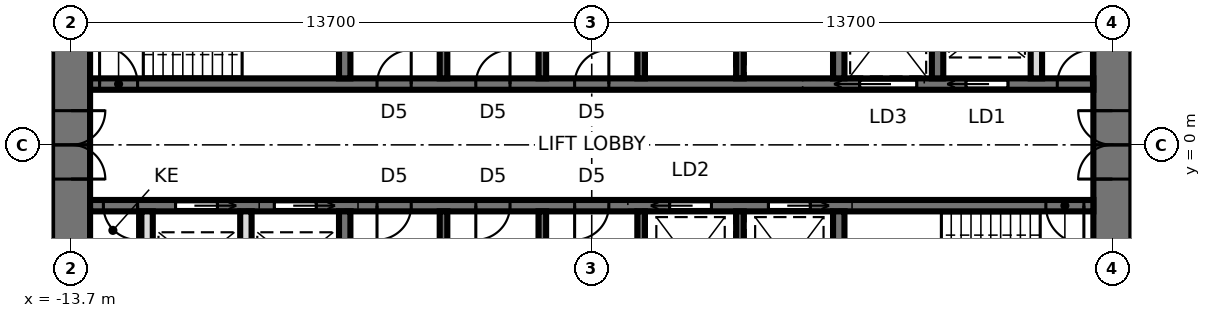
"""IFC4 building model, lengths in metres.
Left out: names, types, materials, properties, quantities, classifications, styles, units other than length and angle.
Written with IfcOpenShell. Run it as: python <this file> out.ifc"""

import sys

from ifc_helpers import new_model, si_unit, direction, frame, frame_2d, origin, place, context, subcontext, project, spatial, rectangle, extrude, element, fill, save


model = new_model("IFC4")
c1 = context("Model", 3, precision=1e-05, world=origin(), true_north=direction((0.0, 1.0)))
c2 = subcontext(c1, "Body", "Model", "MODEL_VIEW")
j1 = project(units=[si_unit("LENGTHUNIT", "METRE"), si_unit("PLANEANGLEUNIT", "RADIAN")], contexts=[c1])
p1 = place(None, origin())
s1 = spatial("IfcSite", under=j1, at=p1, CompositionType="ELEMENT")
p2 = place(p1, origin())
s2 = spatial("IfcBuilding", under=s1, at=p2, CompositionType="ELEMENT")
p3 = place(p2, frame((0.0, 0.0, 215.0)))
s3 = spatial("IfcBuildingStorey", under=s2, at=p3, CompositionType="ELEMENT", Elevation=215.0)
p4 = place(p3, frame((13.7, -9.5, 0.0), z_axis=(0.0, 0.0, 1.0), x_axis=(0.0, 1.0, 0.0)))
e1 = element("IfcWall", 1, at=p4, inside=s3, PredefinedType="SHEAR", context=c2, shape_type="SweptSolid", body=[
    extrude(rectangle(XDim=19.0, YDim=1.0, at=frame_2d((9.5, 0.0))), origin(), (0.0, 0.0, 1.0), 3.9),
])
p5 = place(p4, frame((8.6, 0.0, 0.0)))
e2 = element("IfcOpeningElement", 2, at=p5, cuts=e1, PredefinedType="OPENING", context=c2, shape_type="SweptSolid", body=[
    extrude(rectangle(XDim=1.8, YDim=2.4, at=frame_2d((0.9, 1.2))), frame((0.0, 0.51, 0.0), z_axis=(0.0, -1.0, 0.0), x_axis=(1.0, 0.0, 0.0)), (0.0, 0.0, 1.0), 1.02),
])
p6 = place(p3, frame((-13.7, 9.5, 0.0), z_axis=(0.0, 0.0, 1.0), x_axis=(0.0, -1.0, 0.0)))
e3 = element("IfcWall", 3, at=p6, inside=s3, PredefinedType="SHEAR", context=c2, shape_type="SweptSolid", body=[
    extrude(rectangle(XDim=19.0, YDim=1.0, at=frame_2d((9.5, 0.0))), origin(), (0.0, 0.0, 1.0), 3.9),
])
p7 = place(p6, frame((8.6, 0.0, 0.0)))
e4 = element("IfcOpeningElement", 4, at=p7, cuts=e3, PredefinedType="OPENING", context=c2, shape_type="SweptSolid", body=[
    extrude(rectangle(XDim=1.8, YDim=2.4, at=frame_2d((0.9, 1.2))), frame((0.0, 0.51, 0.0), z_axis=(0.0, -1.0, 0.0), x_axis=(1.0, 0.0, 0.0)), (0.0, 0.0, 1.0), 1.02),
])
p8 = place(p3, frame((-13.2, 1.6, 0.0), z_axis=(0.0, 0.0, 1.0), x_axis=(1.0, 0.0, 0.0)))
e5 = element("IfcWall", 5, at=p8, inside=s3, PredefinedType="SHEAR", context=c2, shape_type="SweptSolid", body=[
    extrude(rectangle(XDim=26.4, YDim=0.3, at=frame_2d((13.2, 0.0))), origin(), (0.0, 0.0, 1.0), 3.9),
])
p9 = place(p8, frame((0.25, 0.0, 0.0)))
e6 = element("IfcOpeningElement", 6, at=p9, cuts=e5, PredefinedType="OPENING", context=c2, shape_type="SweptSolid", body=[
    extrude(rectangle(XDim=1.0, YDim=2.1, at=frame_2d((0.5, 1.05))), frame((0.0, 0.16, 0.0), z_axis=(0.0, -1.0, 0.0), x_axis=(1.0, 0.0, 0.0)), (0.0, 0.0, 1.0), 0.32),
])
p10 = place(p8, frame((23.05, 0.0, 0.0)))
e7 = element("IfcOpeningElement", 7, at=p10, cuts=e5, PredefinedType="OPENING", context=c2, shape_type="SweptSolid", body=[
    extrude(rectangle(XDim=1.1, YDim=2.3, at=frame_2d((0.55, 1.15))), frame((0.0, 0.16, 0.0), z_axis=(0.0, -1.0, 0.0), x_axis=(1.0, 0.0, 0.0)), (0.0, 0.0, 1.0), 0.32),
])
p11 = place(p8, frame((20.25, 0.0, 0.0)))
e8 = element("IfcOpeningElement", 8, at=p11, cuts=e5, PredefinedType="OPENING", context=c2, shape_type="SweptSolid", body=[
    extrude(rectangle(XDim=1.5, YDim=2.4, at=frame_2d((0.75, 1.2))), frame((0.0, 0.16, 0.0), z_axis=(0.0, -1.0, 0.0), x_axis=(1.0, 0.0, 0.0)), (0.0, 0.0, 1.0), 0.32),
])
p12 = place(p8, frame((7.55, 0.0, 0.0)))
e9 = element("IfcOpeningElement", 9, at=p12, cuts=e5, PredefinedType="OPENING", context=c2, shape_type="SweptSolid", body=[
    extrude(rectangle(XDim=0.9, YDim=2.1, at=frame_2d((0.45, 1.05))), frame((0.0, 0.16, 0.0), z_axis=(0.0, -1.0, 0.0), x_axis=(1.0, 0.0, 0.0)), (0.0, 0.0, 1.0), 0.32),
])
p13 = place(p8, frame((10.15, 0.0, 0.0)))
e10 = element("IfcOpeningElement", 10, at=p13, cuts=e5, PredefinedType="OPENING", context=c2, shape_type="SweptSolid", body=[
    extrude(rectangle(XDim=0.9, YDim=2.1, at=frame_2d((0.45, 1.05))), frame((0.0, 0.16, 0.0), z_axis=(0.0, -1.0, 0.0), x_axis=(1.0, 0.0, 0.0)), (0.0, 0.0, 1.0), 0.32),
])
p14 = place(p8, frame((12.75, 0.0, 0.0)))
e11 = element("IfcOpeningElement", 11, at=p14, cuts=e5, PredefinedType="OPENING", context=c2, shape_type="SweptSolid", body=[
    extrude(rectangle(XDim=0.9, YDim=2.1, at=frame_2d((0.45, 1.05))), frame((0.0, 0.16, 0.0), z_axis=(0.0, -1.0, 0.0), x_axis=(1.0, 0.0, 0.0)), (0.0, 0.0, 1.0), 0.32),
])
p15 = place(p8, frame((25.45, 0.0, 0.0)))
e12 = element("IfcOpeningElement", 12, at=p15, cuts=e5, PredefinedType="OPENING", context=c2, shape_type="SweptSolid", body=[
    extrude(rectangle(XDim=0.9, YDim=2.1, at=frame_2d((0.45, 1.05))), frame((0.0, 0.16, 0.0), z_axis=(0.0, -1.0, 0.0), x_axis=(1.0, 0.0, 0.0)), (0.0, 0.0, 1.0), 0.32),
])
p16 = place(p3, frame((-13.2, -1.6, 0.0), z_axis=(0.0, 0.0, 1.0), x_axis=(1.0, 0.0, 0.0)))
e13 = element("IfcWall", 13, at=p16, inside=s3, PredefinedType="SHEAR", context=c2, shape_type="SweptSolid", body=[
    extrude(rectangle(XDim=26.4, YDim=0.3, at=frame_2d((13.2, 0.0))), origin(), (0.0, 0.0, 1.0), 3.9),
])
p17 = place(p16, frame((25.15, 0.0, 0.0)))
e14 = element("IfcOpeningElement", 14, at=p17, cuts=e13, PredefinedType="OPENING", context=c2, shape_type="SweptSolid", body=[
    extrude(rectangle(XDim=1.0, YDim=2.1, at=frame_2d((0.5, 1.05))), frame((0.0, 0.16, 0.0), z_axis=(0.0, -1.0, 0.0), x_axis=(1.0, 0.0, 0.0)), (0.0, 0.0, 1.0), 0.32),
])
p18 = place(p16, frame((7.55, 0.0, 0.0)))
e15 = element("IfcOpeningElement", 15, at=p18, cuts=e13, PredefinedType="OPENING", context=c2, shape_type="SweptSolid", body=[
    extrude(rectangle(XDim=0.9, YDim=2.1, at=frame_2d((0.45, 1.05))), frame((0.0, 0.16, 0.0), z_axis=(0.0, -1.0, 0.0), x_axis=(1.0, 0.0, 0.0)), (0.0, 0.0, 1.0), 0.32),
])
p19 = place(p16, frame((10.15, 0.0, 0.0)))
e16 = element("IfcOpeningElement", 16, at=p19, cuts=e13, PredefinedType="OPENING", context=c2, shape_type="SweptSolid", body=[
    extrude(rectangle(XDim=0.9, YDim=2.1, at=frame_2d((0.45, 1.05))), frame((0.0, 0.16, 0.0), z_axis=(0.0, -1.0, 0.0), x_axis=(1.0, 0.0, 0.0)), (0.0, 0.0, 1.0), 0.32),
])
p20 = place(p16, frame((12.75, 0.0, 0.0)))
e17 = element("IfcOpeningElement", 17, at=p20, cuts=e13, PredefinedType="OPENING", context=c2, shape_type="SweptSolid", body=[
    extrude(rectangle(XDim=0.9, YDim=2.1, at=frame_2d((0.45, 1.05))), frame((0.0, 0.16, 0.0), z_axis=(0.0, -1.0, 0.0), x_axis=(1.0, 0.0, 0.0)), (0.0, 0.0, 1.0), 0.32),
])
p21 = place(p16, frame((15.25, 0.0, 0.0)))
e18 = element("IfcOpeningElement", 18, at=p21, cuts=e13, PredefinedType="OPENING", context=c2, shape_type="SweptSolid", body=[
    extrude(rectangle(XDim=1.1, YDim=2.3, at=frame_2d((0.55, 1.15))), frame((0.0, 0.16, 0.0), z_axis=(0.0, -1.0, 0.0), x_axis=(1.0, 0.0, 0.0)), (0.0, 0.0, 1.0), 0.32),
])
p22 = place(p16, frame((17.85, 0.0, 0.0)))
e19 = element("IfcOpeningElement", 19, at=p22, cuts=e13, PredefinedType="OPENING", context=c2, shape_type="SweptSolid", body=[
    extrude(rectangle(XDim=1.1, YDim=2.3, at=frame_2d((0.55, 1.15))), frame((0.0, 0.16, 0.0), z_axis=(0.0, -1.0, 0.0), x_axis=(1.0, 0.0, 0.0)), (0.0, 0.0, 1.0), 0.32),
])
p23 = place(p16, frame((4.85, 0.0, 0.0)))
e20 = element("IfcOpeningElement", 20, at=p23, cuts=e13, PredefinedType="OPENING", context=c2, shape_type="SweptSolid", body=[
    extrude(rectangle(XDim=1.1, YDim=2.3, at=frame_2d((0.55, 1.15))), frame((0.0, 0.16, 0.0), z_axis=(0.0, -1.0, 0.0), x_axis=(1.0, 0.0, 0.0)), (0.0, 0.0, 1.0), 0.32),
])
p24 = place(p16, frame((2.25, 0.0, 0.0)))
e21 = element("IfcOpeningElement", 21, at=p24, cuts=e13, PredefinedType="OPENING", context=c2, shape_type="SweptSolid", body=[
    extrude(rectangle(XDim=1.1, YDim=2.3, at=frame_2d((0.55, 1.15))), frame((0.0, 0.16, 0.0), z_axis=(0.0, -1.0, 0.0), x_axis=(1.0, 0.0, 0.0)), (0.0, 0.0, 1.0), 0.32),
])
p25 = place(p16, frame((0.35, 0.0, 0.0)))
e22 = element("IfcOpeningElement", 22, at=p25, cuts=e13, PredefinedType="OPENING", context=c2, shape_type="SweptSolid", body=[
    extrude(rectangle(XDim=0.9, YDim=2.1, at=frame_2d((0.45, 1.05))), frame((0.0, 0.16, 0.0), z_axis=(0.0, -1.0, 0.0), x_axis=(1.0, 0.0, 0.0)), (0.0, 0.0, 1.0), 0.32),
])
for number, where, z_axis, x_axis in (
    (23, (-6.5, 1.75, 0.0), (0.0, 0.0, 1.0), (0.0, 1.0, 0.0)),
    (24, (6.5, 1.75, 0.0), (0.0, 0.0, 1.0), (0.0, 1.0, 0.0)),
):
    element("IfcWall", number, at=place(p3, frame(where, z_axis=z_axis, x_axis=x_axis)), inside=s3, PredefinedType="SHEAR", context=c2, shape_type="SweptSolid", body=[
        extrude(rectangle(XDim=2.7, YDim=0.3, at=frame_2d((1.35, 0.0))), origin(), (0.0, 0.0, 1.0), 3.9),
    ])
for number, where, z_axis, x_axis in (
    (25, (-3.9, 1.75, 0.0), (0.0, 0.0, 1.0), (0.0, 1.0, 0.0)),
    (26, (-1.3, 1.75, 0.0), (0.0, 0.0, 1.0), (0.0, 1.0, 0.0)),
    (27, (1.3, 1.75, 0.0), (0.0, 0.0, 1.0), (0.0, 1.0, 0.0)),
    (28, (3.9, 1.75, 0.0), (0.0, 0.0, 1.0), (0.0, 1.0, 0.0)),
):
    element("IfcWall", number, at=place(p3, frame(where, z_axis=z_axis, x_axis=x_axis)), inside=s3, PredefinedType="SHEAR", context=c2, shape_type="SweptSolid", body=[
        extrude(rectangle(XDim=2.7, YDim=0.2, at=frame_2d((1.35, 0.0))), origin(), (0.0, 0.0, 1.0), 3.9),
    ])
for number, where, z_axis, x_axis in (
    (29, (-6.5, -1.75, 0.0), (0.0, 0.0, 1.0), (0.0, -1.0, 0.0)),
    (30, (6.5, -1.75, 0.0), (0.0, 0.0, 1.0), (0.0, -1.0, 0.0)),
):
    element("IfcWall", number, at=place(p3, frame(where, z_axis=z_axis, x_axis=x_axis)), inside=s3, PredefinedType="SHEAR", context=c2, shape_type="SweptSolid", body=[
        extrude(rectangle(XDim=2.7, YDim=0.3, at=frame_2d((1.35, 0.0))), origin(), (0.0, 0.0, 1.0), 3.9),
    ])
for number, where, z_axis, x_axis in (
    (31, (-3.9, -1.75, 0.0), (0.0, 0.0, 1.0), (0.0, -1.0, 0.0)),
    (32, (-1.3, -1.75, 0.0), (0.0, 0.0, 1.0), (0.0, -1.0, 0.0)),
    (33, (1.3, -1.75, 0.0), (0.0, 0.0, 1.0), (0.0, -1.0, 0.0)),
    (34, (3.9, -1.75, 0.0), (0.0, 0.0, 1.0), (0.0, -1.0, 0.0)),
):
    element("IfcWall", number, at=place(p3, frame(where, z_axis=z_axis, x_axis=x_axis)), inside=s3, PredefinedType="SHEAR", context=c2, shape_type="SweptSolid", body=[
        extrude(rectangle(XDim=2.7, YDim=0.2, at=frame_2d((1.35, 0.0))), origin(), (0.0, 0.0, 1.0), 3.9),
    ])
p26 = place(p3, frame((9.1, 1.75, 0.0), z_axis=(0.0, 0.0, 1.0), x_axis=(0.0, 1.0, 0.0)))
e35 = element("IfcWall", 35, at=p26, inside=s3, PredefinedType="SHEAR", context=c2, shape_type="SweptSolid", body=[
    extrude(rectangle(XDim=2.7, YDim=0.3, at=frame_2d((1.35, 0.0))), origin(), (0.0, 0.0, 1.0), 3.9),
])
for number, where, z_axis, x_axis in (
    (36, (-9.1, -1.75, 0.0), (0.0, 0.0, 1.0), (0.0, -1.0, 0.0)),
    (37, (-11.7, -1.75, 0.0), (0.0, 0.0, 1.0), (0.0, -1.0, 0.0)),
    (38, (11.7, 1.75, 0.0), (0.0, 0.0, 1.0), (0.0, 1.0, 0.0)),
):
    element("IfcWall", number, at=place(p3, frame(where, z_axis=z_axis, x_axis=x_axis)), inside=s3, PredefinedType="SOLIDWALL", context=c2, shape_type="SweptSolid", body=[
        extrude(rectangle(XDim=2.7, YDim=0.3, at=frame_2d((1.35, 0.0))), origin(), (0.0, 0.0, 1.0), 3.74),
    ])
p27 = place(p7, origin())
e39 = element("IfcDoor", 39, at=p27, inside=s3, OperationType="DOUBLE_DOOR_SINGLE_SWING", PredefinedType="DOOR", context=c2, shape_type="SweptSolid", body=[
    extrude(rectangle(XDim=1.72, YDim=2.36, at=frame_2d((0.9, 1.18))), frame((0.0, 0.025, 0.0), z_axis=(0.0, -1.0, 0.0), x_axis=(1.0, 0.0, 0.0)), (0.0, 0.0, 1.0), 0.05),
    extrude(rectangle(XDim=0.04, YDim=2.4, at=frame_2d((0.02, 1.2))), frame((0.0, 0.25, 0.0), z_axis=(0.0, -1.0, 0.0), x_axis=(1.0, 0.0, 0.0)), (0.0, 0.0, 1.0), 0.5),
    extrude(rectangle(XDim=0.04, YDim=2.4, at=frame_2d((1.78, 1.2))), frame((0.0, 0.25, 0.0), z_axis=(0.0, -1.0, 0.0), x_axis=(1.0, 0.0, 0.0)), (0.0, 0.0, 1.0), 0.5),
    extrude(rectangle(XDim=1.72, YDim=0.04, at=frame_2d((0.9, 2.38))), frame((0.0, 0.25, 0.0), z_axis=(0.0, -1.0, 0.0), x_axis=(1.0, 0.0, 0.0)), (0.0, 0.0, 1.0), 0.5),
])
fill(e4, e39)
p28 = place(p5, origin())
e40 = element("IfcDoor", 40, at=p28, inside=s3, OperationType="DOUBLE_DOOR_SINGLE_SWING", PredefinedType="DOOR", context=c2, shape_type="SweptSolid", body=[
    extrude(rectangle(XDim=1.72, YDim=2.36, at=frame_2d((0.9, 1.18))), frame((0.0, 0.025, 0.0), z_axis=(0.0, -1.0, 0.0), x_axis=(1.0, 0.0, 0.0)), (0.0, 0.0, 1.0), 0.05),
    extrude(rectangle(XDim=0.04, YDim=2.4, at=frame_2d((0.02, 1.2))), frame((0.0, 0.25, 0.0), z_axis=(0.0, -1.0, 0.0), x_axis=(1.0, 0.0, 0.0)), (0.0, 0.0, 1.0), 0.5),
    extrude(rectangle(XDim=0.04, YDim=2.4, at=frame_2d((1.78, 1.2))), frame((0.0, 0.25, 0.0), z_axis=(0.0, -1.0, 0.0), x_axis=(1.0, 0.0, 0.0)), (0.0, 0.0, 1.0), 0.5),
    extrude(rectangle(XDim=1.72, YDim=0.04, at=frame_2d((0.9, 2.38))), frame((0.0, 0.25, 0.0), z_axis=(0.0, -1.0, 0.0), x_axis=(1.0, 0.0, 0.0)), (0.0, 0.0, 1.0), 0.5),
])
fill(e2, e40)
p29 = place(p9, origin())
e41 = element("IfcDoor", 41, at=p29, inside=s3, OperationType="SINGLE_SWING_LEFT", PredefinedType="DOOR", context=c2, shape_type="SweptSolid", body=[
    extrude(rectangle(XDim=1.0, YDim=2.1, at=frame_2d((0.5, 1.05))), frame((0.0, 0.025, 0.0), z_axis=(0.0, -1.0, 0.0), x_axis=(1.0, 0.0, 0.0)), (0.0, 0.0, 1.0), 0.05),
])
fill(e6, e41)
p30 = place(p17, frame((1.0, 0.0, 0.0), z_axis=(0.0, 0.0, 1.0), x_axis=(-1.0, 0.0, 0.0)))
e42 = element("IfcDoor", 42, at=p30, inside=s3, OperationType="SINGLE_SWING_LEFT", PredefinedType="DOOR", context=c2, shape_type="SweptSolid", body=[
    extrude(rectangle(XDim=1.0, YDim=2.1, at=frame_2d((0.5, 1.05))), frame((0.0, 0.025, 0.0), z_axis=(0.0, -1.0, 0.0), x_axis=(1.0, 0.0, 0.0)), (0.0, 0.0, 1.0), 0.05),
])
fill(e14, e42)
p31 = place(p10, origin())
e43 = element("IfcDoor", 43, at=p31, inside=s3, OperationType="SLIDING_TO_LEFT", PredefinedType="DOOR", context=c2, shape_type="SweptSolid", body=[
    extrude(rectangle(XDim=1.1, YDim=2.3, at=frame_2d((0.55, 1.15))), frame((0.0, 0.025, 0.0), z_axis=(0.0, -1.0, 0.0), x_axis=(1.0, 0.0, 0.0)), (0.0, 0.0, 1.0), 0.05),
])
fill(e7, e43)
p32 = place(p11, origin())
e44 = element("IfcDoor", 44, at=p32, inside=s3, OperationType="SLIDING_TO_LEFT", PredefinedType="DOOR", context=c2, shape_type="SweptSolid", body=[
    extrude(rectangle(XDim=1.5, YDim=2.4, at=frame_2d((0.75, 1.2))), frame((0.0, 0.025, 0.0), z_axis=(0.0, -1.0, 0.0), x_axis=(1.0, 0.0, 0.0)), (0.0, 0.0, 1.0), 0.05),
])
fill(e8, e44)
p33 = place(p12, origin())
e45 = element("IfcDoor", 45, at=p33, inside=s3, OperationType="SINGLE_SWING_RIGHT", PredefinedType="DOOR", context=c2, shape_type="SweptSolid", body=[
    extrude(rectangle(XDim=0.9, YDim=2.1, at=frame_2d((0.45, 1.05))), frame((0.0, 0.025, 0.0), z_axis=(0.0, -1.0, 0.0), x_axis=(1.0, 0.0, 0.0)), (0.0, 0.0, 1.0), 0.05),
])
fill(e9, e45)
p34 = place(p13, origin())
e46 = element("IfcDoor", 46, at=p34, inside=s3, OperationType="SINGLE_SWING_RIGHT", PredefinedType="DOOR", context=c2, shape_type="SweptSolid", body=[
    extrude(rectangle(XDim=0.9, YDim=2.1, at=frame_2d((0.45, 1.05))), frame((0.0, 0.025, 0.0), z_axis=(0.0, -1.0, 0.0), x_axis=(1.0, 0.0, 0.0)), (0.0, 0.0, 1.0), 0.05),
])
fill(e10, e46)
p35 = place(p14, origin())
e47 = element("IfcDoor", 47, at=p35, inside=s3, OperationType="SINGLE_SWING_RIGHT", PredefinedType="DOOR", context=c2, shape_type="SweptSolid", body=[
    extrude(rectangle(XDim=0.9, YDim=2.1, at=frame_2d((0.45, 1.05))), frame((0.0, 0.025, 0.0), z_axis=(0.0, -1.0, 0.0), x_axis=(1.0, 0.0, 0.0)), (0.0, 0.0, 1.0), 0.05),
])
fill(e11, e47)
p36 = place(p18, frame((0.9, 0.0, 0.0), z_axis=(0.0, 0.0, 1.0), x_axis=(-1.0, 0.0, 0.0)))
e48 = element("IfcDoor", 48, at=p36, inside=s3, OperationType="SINGLE_SWING_RIGHT", PredefinedType="DOOR", context=c2, shape_type="SweptSolid", body=[
    extrude(rectangle(XDim=0.9, YDim=2.1, at=frame_2d((0.45, 1.05))), frame((0.0, 0.025, 0.0), z_axis=(0.0, -1.0, 0.0), x_axis=(1.0, 0.0, 0.0)), (0.0, 0.0, 1.0), 0.05),
])
fill(e15, e48)
p37 = place(p19, frame((0.9, 0.0, 0.0), z_axis=(0.0, 0.0, 1.0), x_axis=(-1.0, 0.0, 0.0)))
e49 = element("IfcDoor", 49, at=p37, inside=s3, OperationType="SINGLE_SWING_RIGHT", PredefinedType="DOOR", context=c2, shape_type="SweptSolid", body=[
    extrude(rectangle(XDim=0.9, YDim=2.1, at=frame_2d((0.45, 1.05))), frame((0.0, 0.025, 0.0), z_axis=(0.0, -1.0, 0.0), x_axis=(1.0, 0.0, 0.0)), (0.0, 0.0, 1.0), 0.05),
])
fill(e16, e49)
p38 = place(p20, frame((0.9, 0.0, 0.0), z_axis=(0.0, 0.0, 1.0), x_axis=(-1.0, 0.0, 0.0)))
e50 = element("IfcDoor", 50, at=p38, inside=s3, OperationType="SINGLE_SWING_RIGHT", PredefinedType="DOOR", context=c2, shape_type="SweptSolid", body=[
    extrude(rectangle(XDim=0.9, YDim=2.1, at=frame_2d((0.45, 1.05))), frame((0.0, 0.025, 0.0), z_axis=(0.0, -1.0, 0.0), x_axis=(1.0, 0.0, 0.0)), (0.0, 0.0, 1.0), 0.05),
])
fill(e17, e50)
p39 = place(p21, frame((1.1, 0.0, 0.0), z_axis=(0.0, 0.0, 1.0), x_axis=(-1.0, 0.0, 0.0)))
e51 = element("IfcDoor", 51, at=p39, inside=s3, OperationType="SLIDING_TO_RIGHT", PredefinedType="DOOR", context=c2, shape_type="SweptSolid", body=[
    extrude(rectangle(XDim=1.1, YDim=2.3, at=frame_2d((0.55, 1.15))), frame((0.0, 0.025, 0.0), z_axis=(0.0, -1.0, 0.0), x_axis=(1.0, 0.0, 0.0)), (0.0, 0.0, 1.0), 0.05),
])
fill(e18, e51)
p40 = place(p22, frame((1.1, 0.0, 0.0), z_axis=(0.0, 0.0, 1.0), x_axis=(-1.0, 0.0, 0.0)))
e52 = element("IfcDoor", 52, at=p40, inside=s3, OperationType="SLIDING_TO_LEFT", PredefinedType="DOOR", context=c2, shape_type="SweptSolid", body=[
    extrude(rectangle(XDim=1.1, YDim=2.3, at=frame_2d((0.55, 1.15))), frame((0.0, 0.025, 0.0), z_axis=(0.0, -1.0, 0.0), x_axis=(1.0, 0.0, 0.0)), (0.0, 0.0, 1.0), 0.05),
])
fill(e19, e52)
p41 = place(p23, frame((1.1, 0.0, 0.0), z_axis=(0.0, 0.0, 1.0), x_axis=(-1.0, 0.0, 0.0)))
e53 = element("IfcDoor", 53, at=p41, inside=s3, OperationType="SLIDING_TO_LEFT", PredefinedType="DOOR", context=c2, shape_type="SweptSolid", body=[
    extrude(rectangle(XDim=1.1, YDim=2.3, at=frame_2d((0.55, 1.15))), frame((0.0, 0.025, 0.0), z_axis=(0.0, -1.0, 0.0), x_axis=(1.0, 0.0, 0.0)), (0.0, 0.0, 1.0), 0.05),
])
fill(e20, e53)
p42 = place(p24, frame((1.1, 0.0, 0.0), z_axis=(0.0, 0.0, 1.0), x_axis=(-1.0, 0.0, 0.0)))
e54 = element("IfcDoor", 54, at=p42, inside=s3, OperationType="SLIDING_TO_LEFT", PredefinedType="DOOR", context=c2, shape_type="SweptSolid", body=[
    extrude(rectangle(XDim=1.1, YDim=2.3, at=frame_2d((0.55, 1.15))), frame((0.0, 0.025, 0.0), z_axis=(0.0, -1.0, 0.0), x_axis=(1.0, 0.0, 0.0)), (0.0, 0.0, 1.0), 0.05),
])
fill(e21, e54)
p43 = place(p15, origin())
e55 = element("IfcDoor", 55, at=p43, inside=s3, OperationType="SINGLE_SWING_RIGHT", PredefinedType="DOOR", context=c2, shape_type="SweptSolid", body=[
    extrude(rectangle(XDim=0.9, YDim=2.1, at=frame_2d((0.45, 1.05))), frame((0.0, 0.025, 0.0), z_axis=(0.0, -1.0, 0.0), x_axis=(1.0, 0.0, 0.0)), (0.0, 0.0, 1.0), 0.05),
])
fill(e12, e55)
p44 = place(p25, frame((0.9, 0.0, 0.0), z_axis=(0.0, 0.0, 1.0), x_axis=(-1.0, 0.0, 0.0)))
e56 = element("IfcDoor", 56, at=p44, inside=s3, OperationType="SINGLE_SWING_LEFT", PredefinedType="DOOR", context=c2, shape_type="SweptSolid", body=[
    extrude(rectangle(XDim=0.9, YDim=2.1, at=frame_2d((0.45, 1.05))), frame((0.0, 0.025, 0.0), z_axis=(0.0, -1.0, 0.0), x_axis=(1.0, 0.0, 0.0)), (0.0, 0.0, 1.0), 0.05),
])
fill(e22, e56)
save(model, sys.argv[1])
